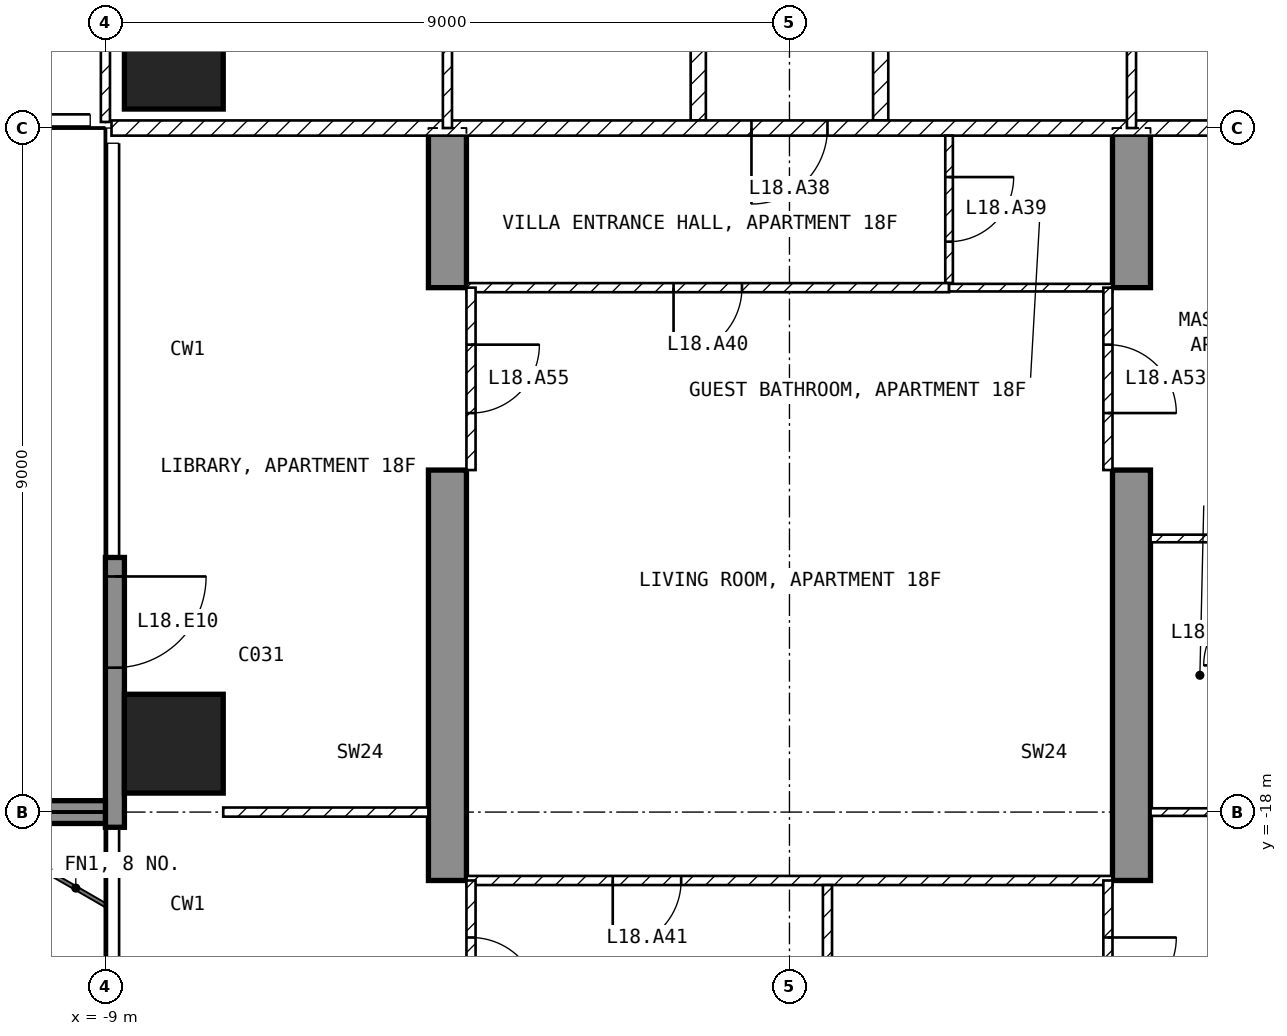
"""IFC4 building model, lengths in metres.
Left out: names, types, materials, properties, quantities, classifications, styles, units other than length and angle.
Written with IfcOpenShell. Run it as: python <this file> out.ifc"""

import sys

from ifc_helpers import new_model, si_unit, direction, frame, frame_2d, origin, origin_2d, place, context, subcontext, project, spatial, polyline, rectangle, outline, extrude, element, fill, save


model = new_model("IFC4")
c1 = context("Model", 3, precision=1e-05, world=origin(), true_north=direction((0.0, 1.0)))
c2 = subcontext(c1, "Body", "Model", "MODEL_VIEW")
j1 = project(units=[si_unit("LENGTHUNIT", "METRE"), si_unit("PLANEANGLEUNIT", "RADIAN")], contexts=[c1])
p1 = place(None, origin())
s1 = spatial("IfcSite", under=j1, at=p1, CompositionType="ELEMENT")
p2 = place(p1, origin())
s2 = spatial("IfcBuilding", under=s1, at=p2, CompositionType="ELEMENT")
p3 = place(p2, frame((0.0, 0.0, 82.0)))
s3 = spatial("IfcBuildingStorey", under=s2, at=p3, CompositionType="ELEMENT", Elevation=82.0)
for number, where, z_axis, x_axis in (
    (1, (-8.1, -17.1, -0.25), (0.0, 0.0, 1.0), (1.0, 0.0, 0.0)),
    (2, (-8.1, -8.1, -0.25), (0.0, 0.0, 1.0), (1.0, 0.0, 0.0)),
):
    element("IfcColumn", number, at=place(p3, frame(where, z_axis=z_axis, x_axis=x_axis)), inside=s3, PredefinedType="COLUMN", context=c2, shape_type="SweptSolid", body=[
        extrude(rectangle(XDim=1.3, YDim=1.3, at=origin_2d()), origin(), (0.0, 0.0, 1.0), 3.5),
    ])
for number, where, z_axis, x_axis in (
    (3, (-4.75, -25.45, -0.25), (1.0, 0.0, 0.0), (0.0, 1.0, 0.0)),
    (4, (4.25, -25.45, -0.25), (1.0, 0.0, 0.0), (0.0, 1.0, 0.0)),
):
    element("IfcWall", number, at=place(p3, frame(where, z_axis=z_axis, x_axis=x_axis)), inside=s3, PredefinedType="SHEAR", context=c2, shape_type="SweptSolid", body=[
        extrude(outline(polyline([(0.0, 0.0), (4.15, 0.0), (4.15, 2.65), (6.55, 2.65), (6.55, 0.0), (11.95, 0.0), (11.95, 2.65), (14.35, 2.65), (14.35, 0.0), (16.45, 0.0), (16.45, 3.5), (0.0, 3.5), (0.0, 0.0)])), origin(), (0.0, 0.0, 1.0), 0.5),
    ])
p4 = place(p3, frame((-8.875, -14.65, 0.0), z_axis=(0.0, 0.0, 1.0), x_axis=(0.0, -1.0, 0.0)))
e5 = element("IfcWall", 5, at=p4, inside=s3, PredefinedType="SOLIDWALL", context=c2, shape_type="SweptSolid", body=[
    extrude(rectangle(XDim=3.55, YDim=0.25, at=frame_2d((1.775, 0.0))), origin(), (0.0, 0.0, 1.0), 3.25),
])
p5 = place(p4, frame((0.25, 0.0, 0.0)))
e6 = element("IfcOpeningElement", 6, at=p5, cuts=e5, PredefinedType="OPENING", context=c2, shape_type="SweptSolid", body=[
    extrude(rectangle(XDim=1.2, YDim=2.4, at=frame_2d((0.6, 1.2))), frame((0.0, 0.135, 0.0), z_axis=(0.0, -1.0, 0.0), x_axis=(1.0, 0.0, 0.0)), (0.0, 0.0, 1.0), 0.27),
])
p6 = place(p3, frame((-9.0, -18.0, 0.0), z_axis=(0.0, 0.0, 1.0), x_axis=(-1.0, 0.0, 0.0)))
e7 = element("IfcWall", 7, at=p6, inside=s3, PredefinedType="SOLIDWALL", context=c2, shape_type="SweptSolid", body=[
    extrude(rectangle(XDim=2.7, YDim=0.3, at=frame_2d((1.35, 0.0))), origin(), (0.0, 0.0, 1.0), 3.25),
])
for number, where, z_axis, x_axis in (
    (8, (1.2, -1.3, 0.0), (0.0, 0.0, 1.0), (0.0, -1.0, 0.0)),
    (9, (-1.2, -8.9, 0.0), (0.0, 0.0, 1.0), (0.0, 1.0, 0.0)),
):
    element("IfcWall", number, at=place(p3, frame(where, z_axis=z_axis, x_axis=x_axis)), inside=s3, PredefinedType="PARTITIONING", context=c2, shape_type="SweptSolid", body=[
        extrude(rectangle(XDim=7.6, YDim=0.2, at=frame_2d((3.8, 0.0))), origin(), (0.0, 0.0, 1.0), 3.25),
    ])
p7 = place(p3, frame((8.92, -9.0, 0.0), z_axis=(0.0, 0.0, 1.0), x_axis=(-1.0, 0.0, 0.0)))
e10 = element("IfcWall", 10, at=p7, inside=s3, PredefinedType="PARTITIONING", context=c2, shape_type="SweptSolid", body=[
    extrude(rectangle(XDim=17.84, YDim=0.2, at=frame_2d((8.92, 0.0))), origin(), (0.0, 0.0, 1.0), 3.25),
])
p8 = place(p7, frame((8.42, 0.0, 0.0)))
e11 = element("IfcOpeningElement", 11, at=p8, cuts=e10, PredefinedType="OPENING", context=c2, shape_type="SweptSolid", body=[
    extrude(rectangle(XDim=1.0, YDim=2.1, at=frame_2d((0.5, 1.05))), frame((0.0, 0.11, 0.0), z_axis=(0.0, -1.0, 0.0), x_axis=(1.0, 0.0, 0.0)), (0.0, 0.0, 1.0), 0.22),
])
p9 = place(p3, frame((4.5, -9.0, 0.0), z_axis=(0.0, 0.0, 1.0), x_axis=(0.0, 1.0, 0.0)))
e12 = element("IfcWall", 12, at=p9, inside=s3, PredefinedType="PARTITIONING", context=c2, shape_type="SweptSolid", body=[
    extrude(rectangle(XDim=3.9, YDim=0.12, at=frame_2d((1.95, 0.0))), origin(), (0.0, 0.0, 1.0), 3.25),
])
p10 = place(p9, frame((1.5, 0.0, 0.0)))
e13 = element("IfcOpeningElement", 13, at=p10, cuts=e12, PredefinedType="OPENING", context=c2, shape_type="SweptSolid", body=[
    extrude(rectangle(XDim=0.9, YDim=2.1, at=frame_2d((0.45, 1.05))), frame((0.0, 0.07, 0.0), z_axis=(0.0, -1.0, 0.0), x_axis=(1.0, 0.0, 0.0)), (0.0, 0.0, 1.0), 0.14),
])
p11 = place(p3, frame((-9.0, -1.3, 0.0), z_axis=(0.0, 0.0, 1.0), x_axis=(0.0, -1.0, 0.0)))
e14 = element("IfcWall", 14, at=p11, inside=s3, PredefinedType="PARTITIONING", context=c2, shape_type="SweptSolid", body=[
    extrude(rectangle(XDim=7.62, YDim=0.12, at=frame_2d((3.81, 0.0))), origin(), (0.0, 0.0, 1.0), 3.25),
])
p12 = place(p11, frame((4.05, 0.0, 0.0)))
e15 = element("IfcOpeningElement", 15, at=p12, cuts=e14, PredefinedType="OPENING", context=c2, shape_type="SweptSolid", body=[
    extrude(rectangle(XDim=0.9, YDim=2.1, at=frame_2d((0.45, 1.05))), frame((0.0, 0.07, 0.0), z_axis=(0.0, -1.0, 0.0), x_axis=(1.0, 0.0, 0.0)), (0.0, 0.0, 1.0), 0.14),
])
p13 = place(p3, frame((-4.5, -1.3, 0.0), z_axis=(0.0, 0.0, 1.0), x_axis=(0.0, -1.0, 0.0)))
e16 = element("IfcWall", 16, at=p13, inside=s3, PredefinedType="PARTITIONING", context=c2, shape_type="SweptSolid", body=[
    extrude(rectangle(XDim=7.7, YDim=0.12, at=frame_2d((3.85, 0.0))), origin(), (0.0, 0.0, 1.0), 3.25),
])
p14 = place(p13, frame((3.4, 0.0, 0.0)))
e17 = element("IfcOpeningElement", 17, at=p14, cuts=e16, PredefinedType="OPENING", context=c2, shape_type="SweptSolid", body=[
    extrude(rectangle(XDim=0.9, YDim=2.1, at=frame_2d((0.45, 1.05))), frame((0.0, 0.07, 0.0), z_axis=(0.0, -1.0, 0.0), x_axis=(1.0, 0.0, 0.0)), (0.0, 0.0, 1.0), 0.14),
])
p15 = place(p3, frame((2.1, -9.1, 0.0), z_axis=(0.0, 0.0, 1.0), x_axis=(0.0, -1.0, 0.0)))
e18 = element("IfcWall", 18, at=p15, inside=s3, PredefinedType="PARTITIONING", context=c2, shape_type="SweptSolid", body=[
    extrude(rectangle(XDim=1.94, YDim=0.1, at=frame_2d((0.97, 0.0))), origin(), (0.0, 0.0, 1.0), 3.25),
])
p16 = place(p15, frame((0.545, 0.0, 0.0)))
e19 = element("IfcOpeningElement", 19, at=p16, cuts=e18, PredefinedType="OPENING", context=c2, shape_type="SweptSolid", body=[
    extrude(rectangle(XDim=0.85, YDim=2.1, at=frame_2d((0.425, 1.05))), frame((0.0, 0.06, 0.0), z_axis=(0.0, -1.0, 0.0), x_axis=(1.0, 0.0, 0.0)), (0.0, 0.0, 1.0), 0.12),
])
p17 = place(p3, frame((2.1, -11.1, 0.0), z_axis=(0.0, 0.0, 1.0), x_axis=(-1.0, 0.0, 0.0)))
e20 = element("IfcWall", 20, at=p17, inside=s3, PredefinedType="PARTITIONING", context=c2, shape_type="SweptSolid", body=[
    extrude(rectangle(XDim=6.35, YDim=0.12, at=frame_2d((3.175, 0.0))), origin(), (0.0, 0.0, 1.0), 3.25),
])
p18 = place(p17, frame((2.725, 0.0, 0.0)))
e21 = element("IfcOpeningElement", 21, at=p18, cuts=e20, PredefinedType="OPENING", context=c2, shape_type="SweptSolid", body=[
    extrude(rectangle(XDim=0.9, YDim=2.1, at=frame_2d((0.45, 1.05))), frame((0.0, 0.07, 0.0), z_axis=(0.0, -1.0, 0.0), x_axis=(1.0, 0.0, 0.0)), (0.0, 0.0, 1.0), 0.14),
])
p19 = place(p3, frame((4.25, -11.1, 0.0), z_axis=(0.0, 0.0, 1.0), x_axis=(-1.0, 0.0, 0.0)))
e22 = element("IfcWall", 22, at=p19, inside=s3, PredefinedType="PARTITIONING", context=c2, shape_type="SweptSolid", body=[
    extrude(rectangle(XDim=2.15, YDim=0.1, at=frame_2d((1.075, 0.0))), origin(), (0.0, 0.0, 1.0), 3.25),
])
p20 = place(p3, frame((4.25, -18.9, 0.0), z_axis=(0.0, 0.0, 1.0), x_axis=(-1.0, 0.0, 0.0)))
e23 = element("IfcWall", 23, at=p20, inside=s3, PredefinedType="PARTITIONING", context=c2, shape_type="SweptSolid", body=[
    extrude(rectangle(XDim=8.5, YDim=0.12, at=frame_2d((4.25, 0.0))), origin(), (0.0, 0.0, 1.0), 3.25),
])
p21 = place(p20, frame((5.675, 0.0, 0.0)))
e24 = element("IfcOpeningElement", 24, at=p21, cuts=e23, PredefinedType="OPENING", context=c2, shape_type="SweptSolid", body=[
    extrude(rectangle(XDim=0.9, YDim=2.1, at=frame_2d((0.45, 1.05))), frame((0.0, 0.07, 0.0), z_axis=(0.0, -1.0, 0.0), x_axis=(1.0, 0.0, 0.0)), (0.0, 0.0, 1.0), 0.14),
])
p22 = place(p3, frame((0.5, -18.96, 0.0), z_axis=(0.0, 0.0, 1.0), x_axis=(0.0, -1.0, 0.0)))
e25 = element("IfcWall", 25, at=p22, inside=s3, PredefinedType="PARTITIONING", context=c2, shape_type="SweptSolid", body=[
    extrude(rectangle(XDim=4.38, YDim=0.12, at=frame_2d((2.19, 0.0))), origin(), (0.0, 0.0, 1.0), 3.25),
])
p23 = place(p22, frame((1.74, 0.0, 0.0)))
e26 = element("IfcOpeningElement", 26, at=p23, cuts=e25, PredefinedType="OPENING", context=c2, shape_type="SweptSolid", body=[
    extrude(rectangle(XDim=0.9, YDim=2.1, at=frame_2d((0.45, 1.05))), frame((0.0, 0.07, 0.0), z_axis=(0.0, -1.0, 0.0), x_axis=(1.0, 0.0, 0.0)), (0.0, 0.0, 1.0), 0.14),
])
p24 = place(p3, frame((6.35, -14.4, 0.0), z_axis=(0.0, 0.0, 1.0), x_axis=(-1.0, 0.0, 0.0)))
e27 = element("IfcWall", 27, at=p24, inside=s3, PredefinedType="PARTITIONING", context=c2, shape_type="SweptSolid", body=[
    extrude(rectangle(XDim=1.6, YDim=0.1, at=frame_2d((0.8, 0.0))), origin(), (0.0, 0.0, 1.0), 3.25),
])
p25 = place(p3, frame((6.3, -18.0, 0.0), z_axis=(0.0, 0.0, 1.0), x_axis=(-1.0, 0.0, 0.0)))
e28 = element("IfcWall", 28, at=p25, inside=s3, PredefinedType="PARTITIONING", context=c2, shape_type="SweptSolid", body=[
    extrude(rectangle(XDim=1.55, YDim=0.1, at=frame_2d((0.775, 0.0))), origin(), (0.0, 0.0, 1.0), 3.25),
])
p26 = place(p3, frame((-4.75, -18.0, 0.0), z_axis=(0.0, 0.0, 1.0), x_axis=(-1.0, 0.0, 0.0)))
e29 = element("IfcWall", 29, at=p26, inside=s3, PredefinedType="PARTITIONING", context=c2, shape_type="SweptSolid", body=[
    extrude(rectangle(XDim=2.7, YDim=0.12, at=frame_2d((1.35, 0.0))), origin(), (0.0, 0.0, 1.0), 3.25),
])
p27 = place(p3, frame((4.19, -11.1, 0.0), z_axis=(0.0, 0.0, 1.0), x_axis=(0.0, -1.0, 0.0)))
e30 = element("IfcWall", 30, at=p27, inside=s3, PredefinedType="PARTITIONING", context=c2, shape_type="SweptSolid", body=[
    extrude(rectangle(XDim=2.4, YDim=0.12, at=frame_2d((1.2, 0.0))), origin(), (0.0, 0.0, 1.0), 2.4),
])
p28 = place(p27, frame((0.75, 0.0, 0.0)))
e31 = element("IfcOpeningElement", 31, at=p28, cuts=e30, PredefinedType="OPENING", context=c2, shape_type="SweptSolid", body=[
    extrude(rectangle(XDim=0.9, YDim=2.1, at=frame_2d((0.45, 1.05))), frame((0.0, 0.07, 0.0), z_axis=(0.0, -1.0, 0.0), x_axis=(1.0, 0.0, 0.0)), (0.0, 0.0, 1.0), 0.14),
])
p29 = place(p3, frame((4.19, -18.9, 0.0), z_axis=(0.0, 0.0, 1.0), x_axis=(0.0, -1.0, 0.0)))
e32 = element("IfcWall", 32, at=p29, inside=s3, PredefinedType="PARTITIONING", context=c2, shape_type="SweptSolid", body=[
    extrude(rectangle(XDim=2.4, YDim=0.12, at=frame_2d((1.2, 0.0))), origin(), (0.0, 0.0, 1.0), 2.4),
])
p30 = place(p29, frame((0.75, 0.0, 0.0)))
e33 = element("IfcOpeningElement", 33, at=p30, cuts=e32, PredefinedType="OPENING", context=c2, shape_type="SweptSolid", body=[
    extrude(rectangle(XDim=0.9, YDim=2.1, at=frame_2d((0.45, 1.05))), frame((0.0, 0.07, 0.0), z_axis=(0.0, -1.0, 0.0), x_axis=(1.0, 0.0, 0.0)), (0.0, 0.0, 1.0), 0.14),
])
p31 = place(p3, frame((-4.19, -11.1, 0.0), z_axis=(0.0, 0.0, 1.0), x_axis=(0.0, -1.0, 0.0)))
e34 = element("IfcWall", 34, at=p31, inside=s3, PredefinedType="PARTITIONING", context=c2, shape_type="SweptSolid", body=[
    extrude(rectangle(XDim=2.4, YDim=0.12, at=frame_2d((1.2, 0.0))), origin(), (0.0, 0.0, 1.0), 2.4),
])
p32 = place(p31, frame((0.75, 0.0, 0.0)))
e35 = element("IfcOpeningElement", 35, at=p32, cuts=e34, PredefinedType="OPENING", context=c2, shape_type="SweptSolid", body=[
    extrude(rectangle(XDim=0.9, YDim=2.1, at=frame_2d((0.45, 1.05))), frame((0.0, 0.07, 0.0), z_axis=(0.0, -1.0, 0.0), x_axis=(1.0, 0.0, 0.0)), (0.0, 0.0, 1.0), 0.14),
])
p33 = place(p3, frame((-4.19, -18.9, 0.0), z_axis=(0.0, 0.0, 1.0), x_axis=(0.0, -1.0, 0.0)))
e36 = element("IfcWall", 36, at=p33, inside=s3, PredefinedType="PARTITIONING", context=c2, shape_type="SweptSolid", body=[
    extrude(rectangle(XDim=2.4, YDim=0.12, at=frame_2d((1.2, 0.0))), origin(), (0.0, 0.0, 1.0), 2.4),
])
p34 = place(p33, frame((0.75, 0.0, 0.0)))
e37 = element("IfcOpeningElement", 37, at=p34, cuts=e36, PredefinedType="OPENING", context=c2, shape_type="SweptSolid", body=[
    extrude(rectangle(XDim=0.9, YDim=2.1, at=frame_2d((0.45, 1.05))), frame((0.0, 0.07, 0.0), z_axis=(0.0, -1.0, 0.0), x_axis=(1.0, 0.0, 0.0)), (0.0, 0.0, 1.0), 0.14),
])
p35 = place(p5, origin())
e38 = element("IfcDoor", 38, at=p35, inside=s3, OperationType="SINGLE_SWING_LEFT", PredefinedType="DOOR", context=c2, shape_type="SweptSolid", body=[
    extrude(rectangle(XDim=1.2, YDim=2.4, at=frame_2d((0.6, 1.2))), frame((0.0, 0.025, 0.0), z_axis=(0.0, -1.0, 0.0), x_axis=(1.0, 0.0, 0.0)), (0.0, 0.0, 1.0), 0.05),
])
fill(e6, e38)
p36 = place(p8, origin())
e39 = element("IfcDoor", 39, at=p36, inside=s3, OperationType="SINGLE_SWING_RIGHT", PredefinedType="DOOR", context=c2, shape_type="SweptSolid", body=[
    extrude(rectangle(XDim=1.0, YDim=2.1, at=frame_2d((0.5, 1.05))), frame((0.0, 0.025, 0.0), z_axis=(0.0, -1.0, 0.0), x_axis=(1.0, 0.0, 0.0)), (0.0, 0.0, 1.0), 0.05),
])
fill(e11, e39)
p37 = place(p16, origin())
e40 = element("IfcDoor", 40, at=p37, inside=s3, OperationType="SINGLE_SWING_LEFT", PredefinedType="DOOR", context=c2, shape_type="SweptSolid", body=[
    extrude(rectangle(XDim=0.85, YDim=2.1, at=frame_2d((0.425, 1.05))), frame((0.0, 0.025, 0.0), z_axis=(0.0, -1.0, 0.0), x_axis=(1.0, 0.0, 0.0)), (0.0, 0.0, 1.0), 0.05),
])
fill(e19, e40)
p38 = place(p18, origin())
e41 = element("IfcDoor", 41, at=p38, inside=s3, OperationType="SINGLE_SWING_RIGHT", PredefinedType="DOOR", context=c2, shape_type="SweptSolid", body=[
    extrude(rectangle(XDim=0.9, YDim=2.1, at=frame_2d((0.45, 1.05))), frame((0.0, 0.025, 0.0), z_axis=(0.0, -1.0, 0.0), x_axis=(1.0, 0.0, 0.0)), (0.0, 0.0, 1.0), 0.05),
])
fill(e21, e41)
p39 = place(p21, origin())
e42 = element("IfcDoor", 42, at=p39, inside=s3, OperationType="SINGLE_SWING_RIGHT", PredefinedType="DOOR", context=c2, shape_type="SweptSolid", body=[
    extrude(rectangle(XDim=0.9, YDim=2.1, at=frame_2d((0.45, 1.05))), frame((0.0, 0.025, 0.0), z_axis=(0.0, -1.0, 0.0), x_axis=(1.0, 0.0, 0.0)), (0.0, 0.0, 1.0), 0.05),
])
fill(e24, e42)
p40 = place(p28, origin())
e43 = element("IfcDoor", 43, at=p40, inside=s3, OperationType="SINGLE_SWING_RIGHT", PredefinedType="DOOR", context=c2, shape_type="SweptSolid", body=[
    extrude(rectangle(XDim=0.9, YDim=2.1, at=frame_2d((0.45, 1.05))), frame((0.0, 0.025, 0.0), z_axis=(0.0, -1.0, 0.0), x_axis=(1.0, 0.0, 0.0)), (0.0, 0.0, 1.0), 0.05),
])
fill(e31, e43)
p41 = place(p30, origin())
e44 = element("IfcDoor", 44, at=p41, inside=s3, OperationType="SINGLE_SWING_LEFT", PredefinedType="DOOR", context=c2, shape_type="SweptSolid", body=[
    extrude(rectangle(XDim=0.9, YDim=2.1, at=frame_2d((0.45, 1.05))), frame((0.0, 0.025, 0.0), z_axis=(0.0, -1.0, 0.0), x_axis=(1.0, 0.0, 0.0)), (0.0, 0.0, 1.0), 0.05),
])
fill(e33, e44)
p42 = place(p32, origin())
e45 = element("IfcDoor", 45, at=p42, inside=s3, OperationType="SINGLE_SWING_LEFT", PredefinedType="DOOR", context=c2, shape_type="SweptSolid", body=[
    extrude(rectangle(XDim=0.9, YDim=2.1, at=frame_2d((0.45, 1.05))), frame((0.0, 0.025, 0.0), z_axis=(0.0, -1.0, 0.0), x_axis=(1.0, 0.0, 0.0)), (0.0, 0.0, 1.0), 0.05),
])
fill(e35, e45)
p43 = place(p34, origin())
e46 = element("IfcDoor", 46, at=p43, inside=s3, OperationType="SINGLE_SWING_RIGHT", PredefinedType="DOOR", context=c2, shape_type="SweptSolid", body=[
    extrude(rectangle(XDim=0.9, YDim=2.1, at=frame_2d((0.45, 1.05))), frame((0.0, 0.025, 0.0), z_axis=(0.0, -1.0, 0.0), x_axis=(1.0, 0.0, 0.0)), (0.0, 0.0, 1.0), 0.05),
])
fill(e37, e46)
save(model, sys.argv[1])
